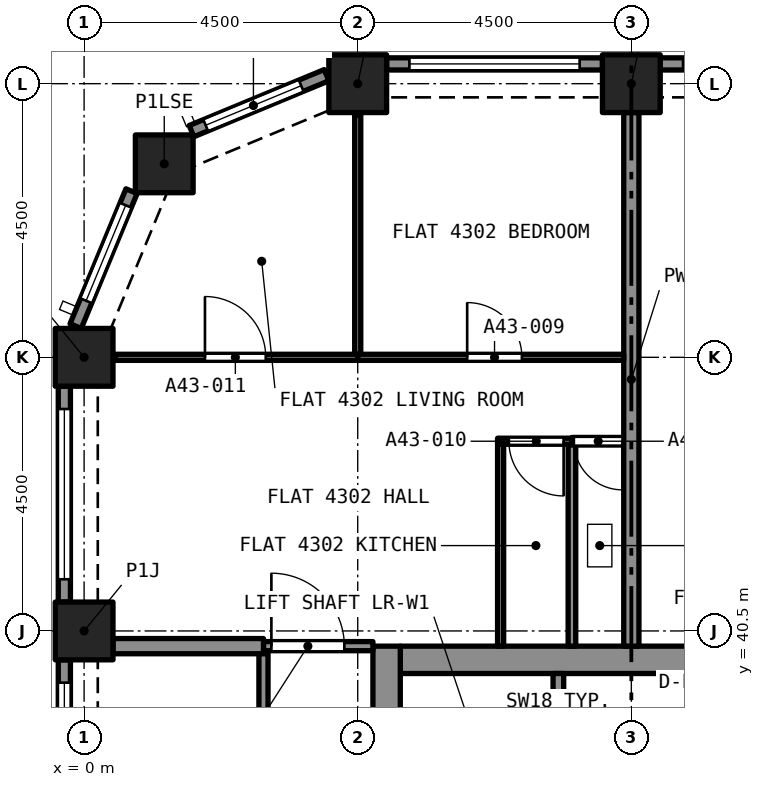
"""IFC4 building model, lengths in metres.
Left out: names, types, materials, properties, quantities, classifications, styles, units other than length and angle.
Written with IfcOpenShell. Run it as: python <this file> out.ifc"""

import sys

from ifc_helpers import new_model, si_unit, direction, frame, frame_2d, origin, origin_2d, place, context, subcontext, project, spatial, rectangle, extrude, element, fill, save


model = new_model("IFC4")
c1 = context("Model", 3, precision=1e-05, world=origin(), true_north=direction((0.0, 1.0)))
c2 = subcontext(c1, "Body", "Model", "MODEL_VIEW")
j1 = project(units=[si_unit("LENGTHUNIT", "METRE"), si_unit("PLANEANGLEUNIT", "RADIAN")], contexts=[c1])
p1 = place(None, origin())
s1 = spatial("IfcSite", under=j1, at=p1, CompositionType="ELEMENT")
p2 = place(p1, origin())
s2 = spatial("IfcBuilding", under=s1, at=p2, CompositionType="ELEMENT")
p3 = place(p2, frame((0.0, 0.0, 155.0)))
s3 = spatial("IfcBuildingStorey", under=s2, at=p3, CompositionType="ELEMENT", Elevation=155.0)
for number, where, z_axis, x_axis in (
    (1, (0.0, 40.5, 0.0), (0.0, 0.0, 1.0), (1.0, 0.0, 0.0)),
    (2, (0.0, 45.0, 0.0), (0.0, 0.0, 1.0), (1.0, 0.0, 0.0)),
    (3, (1.318, 48.182, 0.0), (0.0, 0.0, 1.0), (1.0, 0.0, 0.0)),
    (4, (4.5, 49.5, 0.0), (0.0, 0.0, 1.0), (1.0, 0.0, 0.0)),
    (5, (9.0, 49.5, 0.0), (0.0, 0.0, 1.0), (1.0, 0.0, 0.0)),
):
    element("IfcColumn", number, at=place(p3, frame(where, z_axis=z_axis, x_axis=x_axis)), inside=s3, PredefinedType="COLUMN", context=c2, shape_type="SweptSolid", body=[
        extrude(rectangle(XDim=0.95, YDim=0.95, at=origin_2d()), origin(), (0.0, 0.0, 1.0), 4.4),
    ])
p4 = place(p3, frame((5.2, 40.025, 0.0), z_axis=(0.0, 0.0, 1.0), x_axis=(1.0, 0.0, 0.0)))
e6 = element("IfcWall", 6, at=p4, inside=s3, PredefinedType="SOLIDWALL", context=c2, shape_type="SweptSolid", body=[
    extrude(rectangle(XDim=7.6, YDim=0.45, at=frame_2d((3.8, 0.0))), origin(), (0.0, 0.0, 1.0), 4.4),
])
p5 = place(p3, frame((4.975, 27.25, 0.0), z_axis=(0.0, 0.0, 1.0), x_axis=(0.0, 1.0, 0.0)))
e7 = element("IfcWall", 7, at=p5, inside=s3, PredefinedType="SOLIDWALL", context=c2, shape_type="SweptSolid", body=[
    extrude(rectangle(XDim=13.0, YDim=0.45, at=frame_2d((6.5, 0.0))), origin(), (0.0, 0.0, 1.0), 4.4),
])
p6 = place(p5, frame((8.7, 0.0, 0.0)))
e8 = element("IfcOpeningElement", 8, at=p6, cuts=e7, PredefinedType="OPENING", context=c2, shape_type="SweptSolid", body=[
    extrude(rectangle(XDim=1.2, YDim=2.1, at=frame_2d((0.6, 1.05))), frame((0.0, 0.235, 0.0), z_axis=(0.0, -1.0, 0.0), x_axis=(1.0, 0.0, 0.0)), (0.0, 0.0, 1.0), 0.47),
])
p7 = place(p3, frame((9.475, 49.825, 0.0), z_axis=(0.0, 0.0, 1.0), x_axis=(1.0, 0.0, 0.0)))
e9 = element("IfcWall", 9, at=p7, inside=s3, PredefinedType="SOLIDWALL", context=c2, shape_type="SweptSolid", body=[
    extrude(rectangle(XDim=3.55, YDim=0.2, at=frame_2d((1.775, 0.0))), origin(), (0.0, 0.0, 1.0), 4.4),
])
p8 = place(p7, frame((0.375, 0.0, 0.45)))
e10 = element("IfcOpeningElement", 10, at=p8, cuts=e9, PredefinedType="OPENING", context=c2, shape_type="SweptSolid", body=[
    extrude(rectangle(XDim=2.8, YDim=2.55, at=frame_2d((1.4, 1.275))), frame((0.0, 0.11, 0.0), z_axis=(0.0, -1.0, 0.0), x_axis=(1.0, 0.0, 0.0)), (0.0, 0.0, 1.0), 0.22),
])
p9 = place(p3, frame((4.975, 49.825, 0.0), z_axis=(0.0, 0.0, 1.0), x_axis=(1.0, 0.0, 0.0)))
e11 = element("IfcWall", 11, at=p9, inside=s3, PredefinedType="SOLIDWALL", context=c2, shape_type="SweptSolid", body=[
    extrude(rectangle(XDim=3.55, YDim=0.2, at=frame_2d((1.775, 0.0))), origin(), (0.0, 0.0, 1.0), 4.4),
])
p10 = place(p9, frame((0.375, 0.0, 0.45)))
e12 = element("IfcOpeningElement", 12, at=p10, cuts=e11, PredefinedType="OPENING", context=c2, shape_type="SweptSolid", body=[
    extrude(rectangle(XDim=2.8, YDim=2.55, at=frame_2d((1.4, 1.275))), frame((0.0, 0.11, 0.0), z_axis=(0.0, -1.0, 0.0), x_axis=(1.0, 0.0, 0.0)), (0.0, 0.0, 1.0), 0.22),
])
p11 = place(p3, frame((1.767, 48.72, 0.0), z_axis=(0.0, 0.0, 1.0), x_axis=(0.923880599843, 0.382680855588, 0.0)))
e13 = element("IfcWall", 13, at=p11, inside=s3, PredefinedType="SOLIDWALL", context=c2, shape_type="SweptSolid", body=[
    extrude(rectangle(XDim=2.403, YDim=0.2, at=frame_2d((1.201, 0.0))), origin(), (0.0, 0.0, 1.0), 4.4),
])
p12 = place(p11, frame((0.251, 0.0, 0.45)))
e14 = element("IfcOpeningElement", 14, at=p12, cuts=e13, PredefinedType="OPENING", context=c2, shape_type="SweptSolid", body=[
    extrude(rectangle(XDim=1.7, YDim=2.55, at=frame_2d((0.85, 1.275))), frame((0.0, 0.11, 0.0), z_axis=(0.0, -1.0, 0.0), x_axis=(1.0, 0.0, 0.0)), (0.0, 0.0, 1.0), 0.22),
])
p13 = place(p3, frame((-0.139, 45.513, 0.0), z_axis=(0.0, 0.0, 1.0), x_axis=(0.382680855588, 0.923880599843, 0.0)))
e15 = element("IfcWall", 15, at=p13, inside=s3, PredefinedType="SOLIDWALL", context=c2, shape_type="SweptSolid", body=[
    extrude(rectangle(XDim=2.403, YDim=0.2, at=frame_2d((1.201, 0.0))), origin(), (0.0, 0.0, 1.0), 4.4),
])
p14 = place(p13, frame((0.451, 0.0, 0.45)))
e16 = element("IfcOpeningElement", 16, at=p14, cuts=e15, PredefinedType="OPENING", context=c2, shape_type="SweptSolid", body=[
    extrude(rectangle(XDim=1.7, YDim=2.55, at=frame_2d((0.85, 1.275))), frame((0.0, 0.11, 0.0), z_axis=(0.0, -1.0, 0.0), x_axis=(1.0, 0.0, 0.0)), (0.0, 0.0, 1.0), 0.22),
])
p15 = place(p3, frame((-0.325, 40.975, 0.0), z_axis=(0.0, 0.0, 1.0), x_axis=(0.0, 1.0, 0.0)))
e17 = element("IfcWall", 17, at=p15, inside=s3, PredefinedType="SOLIDWALL", context=c2, shape_type="SweptSolid", body=[
    extrude(rectangle(XDim=3.55, YDim=0.2, at=frame_2d((1.775, 0.0))), origin(), (0.0, 0.0, 1.0), 4.4),
])
p16 = place(p15, frame((0.375, 0.0, 0.45)))
e18 = element("IfcOpeningElement", 18, at=p16, cuts=e17, PredefinedType="OPENING", context=c2, shape_type="SweptSolid", body=[
    extrude(rectangle(XDim=2.8, YDim=2.55, at=frame_2d((1.4, 1.275))), frame((0.0, 0.11, 0.0), z_axis=(0.0, -1.0, 0.0), x_axis=(1.0, 0.0, 0.0)), (0.0, 0.0, 1.0), 0.22),
])
p17 = place(p3, frame((-0.325, 36.475, 0.0), z_axis=(0.0, 0.0, 1.0), x_axis=(0.0, 1.0, 0.0)))
e19 = element("IfcWall", 19, at=p17, inside=s3, PredefinedType="SOLIDWALL", context=c2, shape_type="SweptSolid", body=[
    extrude(rectangle(XDim=3.55, YDim=0.2, at=frame_2d((1.775, 0.0))), origin(), (0.0, 0.0, 1.0), 4.4),
])
p18 = place(p17, frame((0.375, 0.0, 0.45)))
e20 = element("IfcOpeningElement", 20, at=p18, cuts=e19, PredefinedType="OPENING", context=c2, shape_type="SweptSolid", body=[
    extrude(rectangle(XDim=2.8, YDim=2.55, at=frame_2d((1.4, 1.275))), frame((0.0, 0.11, 0.0), z_axis=(0.0, -1.0, 0.0), x_axis=(1.0, 0.0, 0.0)), (0.0, 0.0, 1.0), 0.22),
])
p19 = place(p3, frame((8.875, 43.62, 0.0), z_axis=(0.0, 0.0, 1.0), x_axis=(-1.0, 0.0, 0.0)))
e21 = element("IfcWall", 21, at=p19, inside=s3, PredefinedType="PARTITIONING", context=c2, shape_type="SweptSolid", body=[
    extrude(rectangle(XDim=0.852, YDim=0.125, at=frame_2d((0.426, 0.0))), origin(), (0.0, 0.0, 1.0), 4.1),
])
p20 = place(p19, frame((0.02, 0.0, 0.0)))
e22 = element("IfcOpeningElement", 22, at=p20, cuts=e21, PredefinedType="OPENING", context=c2, shape_type="SweptSolid", body=[
    extrude(rectangle(XDim=0.8, YDim=2.1, at=frame_2d((0.4, 1.05))), frame((0.0, 0.073, 0.0), z_axis=(0.0, -1.0, 0.0), x_axis=(1.0, 0.0, 0.0)), (0.0, 0.0, 1.0), 0.145),
])
p21 = place(p3, frame((8.023, 40.25, 0.0), z_axis=(0.0, 0.0, 1.0), x_axis=(0.0, 1.0, 0.0)))
e23 = element("IfcWall", 23, at=p21, inside=s3, PredefinedType="PARTITIONING", context=c2, shape_type="SweptSolid", body=[
    extrude(rectangle(XDim=3.308, YDim=0.125, at=frame_2d((1.654, 0.0))), origin(), (0.0, 0.0, 1.0), 4.1),
])
p22 = place(p3, frame((9.0, 40.25, 0.0), z_axis=(0.0, 0.0, 1.0), x_axis=(0.0, 1.0, 0.0)))
e24 = element("IfcWall", 24, at=p22, inside=s3, PredefinedType="PARTITIONING", context=c2, shape_type="SweptSolid", body=[
    extrude(rectangle(XDim=8.775, YDim=0.25, at=frame_2d((4.387, 0.0))), origin(), (0.0, 0.0, 1.0), 4.1),
])
p23 = place(p3, frame((4.5, 45.0, 0.0), z_axis=(0.0, 0.0, 1.0), x_axis=(1.0, 0.0, 0.0)))
e25 = element("IfcWall", 25, at=p23, inside=s3, PredefinedType="PARTITIONING", context=c2, shape_type="SweptSolid", body=[
    extrude(rectangle(XDim=4.375, YDim=0.1, at=frame_2d((2.188, 0.0))), origin(), (0.0, 0.0, 1.0), 4.1),
])
p24 = place(p23, frame((1.8, 0.0, 0.0)))
e26 = element("IfcOpeningElement", 26, at=p24, cuts=e25, PredefinedType="OPENING", context=c2, shape_type="SweptSolid", body=[
    extrude(rectangle(XDim=0.9, YDim=2.1, at=frame_2d((0.45, 1.05))), frame((0.0, 0.06, 0.0), z_axis=(0.0, -1.0, 0.0), x_axis=(1.0, 0.0, 0.0)), (0.0, 0.0, 1.0), 0.12),
])
p25 = place(p3, frame((4.5, 45.05, 0.0), z_axis=(0.0, 0.0, 1.0), x_axis=(0.0, 1.0, 0.0)))
e27 = element("IfcWall", 27, at=p25, inside=s3, PredefinedType="PARTITIONING", context=c2, shape_type="SweptSolid", body=[
    extrude(rectangle(XDim=3.936, YDim=0.1, at=frame_2d((1.968, 0.0))), origin(), (0.0, 0.0, 1.0), 4.1),
])
p26 = place(p3, frame((8.023, 43.62, 0.0), z_axis=(0.0, 0.0, 1.0), x_axis=(-1.0, 0.0, 0.0)))
e28 = element("IfcWall", 28, at=p26, inside=s3, PredefinedType="PARTITIONING", context=c2, shape_type="SweptSolid", body=[
    extrude(rectangle(XDim=1.223, YDim=0.1, at=frame_2d((0.611, 0.0))), origin(), (0.0, 0.0, 1.0), 4.1),
])
p27 = place(p26, frame((0.136, 0.0, 0.0)))
e29 = element("IfcOpeningElement", 29, at=p27, cuts=e28, PredefinedType="OPENING", context=c2, shape_type="SweptSolid", body=[
    extrude(rectangle(XDim=0.9, YDim=2.1, at=frame_2d((0.45, 1.05))), frame((0.0, 0.06, 0.0), z_axis=(0.0, -1.0, 0.0), x_axis=(1.0, 0.0, 0.0)), (0.0, 0.0, 1.0), 0.12),
])
p28 = place(p3, frame((6.85, 40.25, 0.0), z_axis=(0.0, 0.0, 1.0), x_axis=(0.0, 1.0, 0.0)))
e30 = element("IfcWall", 30, at=p28, inside=s3, PredefinedType="PARTITIONING", context=c2, shape_type="SweptSolid", body=[
    extrude(rectangle(XDim=3.32, YDim=0.1, at=frame_2d((1.66, 0.0))), origin(), (0.0, 0.0, 1.0), 4.1),
])
p29 = place(p3, frame((0.514, 45.0, 0.0), z_axis=(0.0, 0.0, 1.0), x_axis=(1.0, 0.0, 0.0)))
e31 = element("IfcWall", 31, at=p29, inside=s3, PredefinedType="PARTITIONING", context=c2, shape_type="SweptSolid", body=[
    extrude(rectangle(XDim=3.986, YDim=0.1, at=frame_2d((1.993, 0.0))), origin(), (0.0, 0.0, 1.0), 4.1),
])
p30 = place(p29, frame((1.473, 0.0, 0.0)))
e32 = element("IfcOpeningElement", 32, at=p30, cuts=e31, PredefinedType="OPENING", context=c2, shape_type="SweptSolid", body=[
    extrude(rectangle(XDim=1.0, YDim=2.1, at=frame_2d((0.5, 1.05))), frame((0.0, 0.06, 0.0), z_axis=(0.0, -1.0, 0.0), x_axis=(1.0, 0.0, 0.0)), (0.0, 0.0, 1.0), 0.12),
])
p31 = place(p3, frame((2.95, 40.25, 0.0), z_axis=(0.0, 0.0, 1.0), x_axis=(1.0, 0.0, 0.0)))
e33 = element("IfcWall", 33, at=p31, inside=s3, PredefinedType="PARTITIONING", context=c2, shape_type="SweptSolid", body=[
    extrude(rectangle(XDim=1.8, YDim=0.15, at=frame_2d((0.9, 0.0))), origin(), (0.0, 0.0, 1.0), 4.1),
])
p32 = place(p31, frame((0.13, 0.0, 0.0)))
e34 = element("IfcOpeningElement", 34, at=p32, cuts=e33, PredefinedType="OPENING", context=c2, shape_type="SweptSolid", body=[
    extrude(rectangle(XDim=1.2, YDim=2.4, at=frame_2d((0.6, 1.2))), frame((0.0, 0.085, 0.0), z_axis=(0.0, -1.0, 0.0), x_axis=(1.0, 0.0, 0.0)), (0.0, 0.0, 1.0), 0.17),
])
p33 = place(p3, frame((0.475, 40.25, 0.0), z_axis=(0.0, 0.0, 1.0), x_axis=(1.0, 0.0, 0.0)))
e35 = element("IfcWall", 35, at=p33, inside=s3, PredefinedType="PARTITIONING", context=c2, shape_type="SweptSolid", body=[
    extrude(rectangle(XDim=2.475, YDim=0.25, at=frame_2d((1.237, 0.0))), origin(), (0.0, 0.0, 1.0), 4.1),
])
p34 = place(p3, frame((2.95, 27.175, 0.0), z_axis=(0.0, 0.0, 1.0), x_axis=(0.0, 1.0, 0.0)))
e36 = element("IfcWall", 36, at=p34, inside=s3, PredefinedType="PARTITIONING", context=c2, shape_type="SweptSolid", body=[
    extrude(rectangle(XDim=12.95, YDim=0.15, at=frame_2d((6.475, 0.0))), origin(), (0.0, 0.0, 1.0), 4.1),
])
p35 = place(p34, frame((6.075, 0.0, 0.0)))
e37 = element("IfcOpeningElement", 37, at=p35, cuts=e36, PredefinedType="OPENING", context=c2, shape_type="SweptSolid", body=[
    extrude(rectangle(XDim=1.0, YDim=2.1, at=frame_2d((0.5, 1.05))), frame((0.0, 0.085, 0.0), z_axis=(0.0, -1.0, 0.0), x_axis=(1.0, 0.0, 0.0)), (0.0, 0.0, 1.0), 0.17),
])
p36 = place(p3, frame((7.8, 37.5, 0.0), z_axis=(0.0, 0.0, 1.0), x_axis=(0.0, 1.0, 0.0)))
e38 = element("IfcWall", 38, at=p36, inside=s3, PredefinedType="SOLIDWALL", context=c2, shape_type="SweptSolid", body=[
    extrude(rectangle(XDim=2.3, YDim=0.175, at=frame_2d((1.15, 0.0))), origin(), (0.0, 0.0, 1.0), 4.1),
])
p37 = place(p8, origin())
e39 = element("IfcWindow", 39, at=p37, inside=s3, PartitioningType="SINGLE_PANEL", PredefinedType="WINDOW", context=c2, shape_type="SweptSolid", body=[
    extrude(rectangle(XDim=2.8, YDim=2.55, at=frame_2d((1.4, 1.275))), frame((0.0, 0.03, 0.0), z_axis=(0.0, -1.0, 0.0), x_axis=(1.0, 0.0, 0.0)), (0.0, 0.0, 1.0), 0.06),
])
fill(e10, e39)
p38 = place(p10, origin())
e40 = element("IfcWindow", 40, at=p38, inside=s3, PartitioningType="SINGLE_PANEL", PredefinedType="WINDOW", context=c2, shape_type="SweptSolid", body=[
    extrude(rectangle(XDim=2.8, YDim=2.55, at=frame_2d((1.4, 1.275))), frame((0.0, 0.03, 0.0), z_axis=(0.0, -1.0, 0.0), x_axis=(1.0, 0.0, 0.0)), (0.0, 0.0, 1.0), 0.06),
])
fill(e12, e40)
p39 = place(p12, origin())
e41 = element("IfcWindow", 41, at=p39, inside=s3, PartitioningType="SINGLE_PANEL", PredefinedType="WINDOW", context=c2, shape_type="SweptSolid", body=[
    extrude(rectangle(XDim=1.7, YDim=2.55, at=frame_2d((0.85, 1.275))), frame((0.0, 0.03, 0.0), z_axis=(0.0, -1.0, 0.0), x_axis=(1.0, 0.0, 0.0)), (0.0, 0.0, 1.0), 0.06),
])
fill(e14, e41)
p40 = place(p14, origin())
e42 = element("IfcWindow", 42, at=p40, inside=s3, PartitioningType="SINGLE_PANEL", PredefinedType="WINDOW", context=c2, shape_type="SweptSolid", body=[
    extrude(rectangle(XDim=1.7, YDim=2.55, at=frame_2d((0.85, 1.275))), frame((0.0, 0.03, 0.0), z_axis=(0.0, -1.0, 0.0), x_axis=(1.0, 0.0, 0.0)), (0.0, 0.0, 1.0), 0.06),
])
fill(e16, e42)
p41 = place(p16, origin())
e43 = element("IfcWindow", 43, at=p41, inside=s3, PartitioningType="SINGLE_PANEL", PredefinedType="WINDOW", context=c2, shape_type="SweptSolid", body=[
    extrude(rectangle(XDim=2.8, YDim=2.55, at=frame_2d((1.4, 1.275))), frame((0.0, 0.03, 0.0), z_axis=(0.0, -1.0, 0.0), x_axis=(1.0, 0.0, 0.0)), (0.0, 0.0, 1.0), 0.06),
])
fill(e18, e43)
p42 = place(p18, origin())
e44 = element("IfcWindow", 44, at=p42, inside=s3, PartitioningType="SINGLE_PANEL", PredefinedType="WINDOW", context=c2, shape_type="SweptSolid", body=[
    extrude(rectangle(XDim=2.8, YDim=2.55, at=frame_2d((1.4, 1.275))), frame((0.0, 0.03, 0.0), z_axis=(0.0, -1.0, 0.0), x_axis=(1.0, 0.0, 0.0)), (0.0, 0.0, 1.0), 0.06),
])
fill(e20, e44)
p43 = place(p20, origin())
e45 = element("IfcDoor", 45, at=p43, inside=s3, OperationType="SINGLE_SWING_LEFT", PredefinedType="DOOR", context=c2, shape_type="SweptSolid", body=[
    extrude(rectangle(XDim=0.8, YDim=2.1, at=frame_2d((0.4, 1.05))), frame((0.0, 0.025, 0.0), z_axis=(0.0, -1.0, 0.0), x_axis=(1.0, 0.0, 0.0)), (0.0, 0.0, 1.0), 0.05),
])
fill(e22, e45)
p44 = place(p24, origin())
e46 = element("IfcDoor", 46, at=p44, inside=s3, OperationType="SINGLE_SWING_RIGHT", PredefinedType="DOOR", context=c2, shape_type="SweptSolid", body=[
    extrude(rectangle(XDim=0.9, YDim=2.1, at=frame_2d((0.45, 1.05))), frame((0.0, 0.025, 0.0), z_axis=(0.0, -1.0, 0.0), x_axis=(1.0, 0.0, 0.0)), (0.0, 0.0, 1.0), 0.05),
])
fill(e26, e46)
p45 = place(p27, origin())
e47 = element("IfcDoor", 47, at=p45, inside=s3, OperationType="SINGLE_SWING_LEFT", PredefinedType="DOOR", context=c2, shape_type="SweptSolid", body=[
    extrude(rectangle(XDim=0.9, YDim=2.1, at=frame_2d((0.45, 1.05))), frame((0.0, 0.025, 0.0), z_axis=(0.0, -1.0, 0.0), x_axis=(1.0, 0.0, 0.0)), (0.0, 0.0, 1.0), 0.05),
])
fill(e29, e47)
p46 = place(p30, origin())
e48 = element("IfcDoor", 48, at=p46, inside=s3, OperationType="SINGLE_SWING_LEFT", PredefinedType="DOOR", context=c2, shape_type="SweptSolid", body=[
    extrude(rectangle(XDim=1.0, YDim=2.1, at=frame_2d((0.5, 1.05))), frame((0.0, 0.025, 0.0), z_axis=(0.0, -1.0, 0.0), x_axis=(1.0, 0.0, 0.0)), (0.0, 0.0, 1.0), 0.05),
])
fill(e32, e48)
p47 = place(p32, origin())
e49 = element("IfcDoor", 49, at=p47, inside=s3, OperationType="SINGLE_SWING_LEFT", PredefinedType="DOOR", context=c2, shape_type="SweptSolid", body=[
    extrude(rectangle(XDim=1.2, YDim=2.4, at=frame_2d((0.6, 1.2))), frame((0.0, 0.025, 0.0), z_axis=(0.0, -1.0, 0.0), x_axis=(1.0, 0.0, 0.0)), (0.0, 0.0, 1.0), 0.05),
])
fill(e34, e49)
save(model, sys.argv[1])
